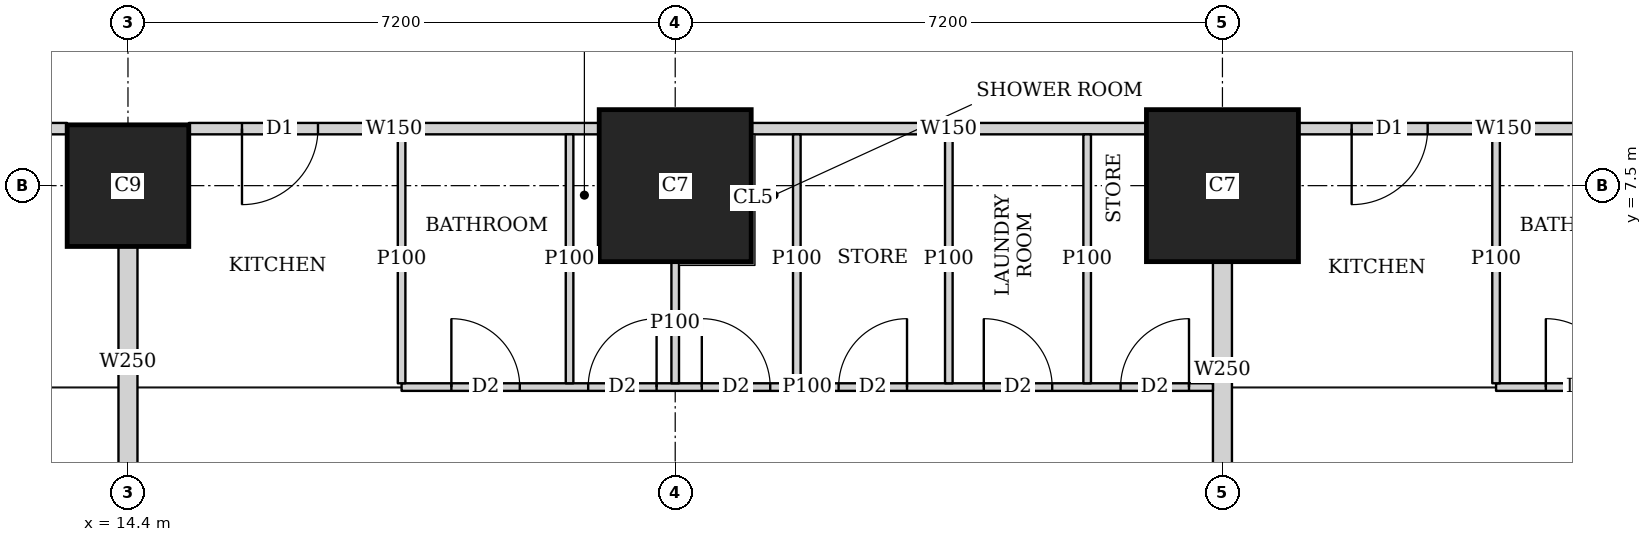
"""IFC4 building model, lengths in metres.
Left out: names, types, materials, properties, quantities, classifications, styles, units other than length and angle.
Written with IfcOpenShell. Run it as: python <this file> out.ifc"""

import sys

from ifc_helpers import new_model, si_unit, direction, frame, frame_2d, origin, origin_2d, place, context, subcontext, project, spatial, rectangle, extrude, element, fill, save


model = new_model("IFC4")
c1 = context("Model", 3, precision=1e-05, world=origin(), true_north=direction((0.0, 1.0)))
c2 = subcontext(c1, "Body", "Model", "MODEL_VIEW")
j1 = project(units=[si_unit("LENGTHUNIT", "METRE"), si_unit("PLANEANGLEUNIT", "RADIAN")], contexts=[c1])
p1 = place(None, origin())
s1 = spatial("IfcSite", under=j1, at=p1, CompositionType="ELEMENT")
p2 = place(p1, origin())
s2 = spatial("IfcBuilding", under=s1, at=p2, CompositionType="ELEMENT")
p3 = place(p2, frame((0.0, 0.0, 77.9)))
s3 = spatial("IfcBuildingStorey", under=s2, at=p3, CompositionType="ELEMENT", Elevation=77.9)
p4 = place(p3, frame((14.4, 7.5, 0.0), z_axis=(0.0, 0.0, 1.0), x_axis=(1.0, 0.0, 0.0)))
e1 = element("IfcColumn", 1, at=p4, inside=s3, PredefinedType="COLUMN", context=c2, shape_type="SweptSolid", body=[
    extrude(rectangle(XDim=1.6, YDim=1.6, at=origin_2d()), origin(), (0.0, 0.0, 1.0), 3.75),
])
for number, where, z_axis, x_axis in (
    (2, (21.6, 7.5, 0.0), (0.0, 0.0, 1.0), (1.0, 0.0, 0.0)),
    (3, (28.8, 7.5, 0.0), (0.0, 0.0, 1.0), (1.0, 0.0, 0.0)),
):
    element("IfcColumn", number, at=place(p3, frame(where, z_axis=z_axis, x_axis=x_axis)), inside=s3, PredefinedType="COLUMN", context=c2, shape_type="SweptSolid", body=[
        extrude(rectangle(XDim=2.0, YDim=2.0, at=origin_2d()), origin(), (0.0, 0.0, 1.0), 3.75),
    ])
p5 = place(p3, frame((35.199, 8.25, 0.0), z_axis=(0.0, 0.0, 1.0), x_axis=(-1.0, 0.0, 0.0)))
e4 = element("IfcWall", 4, at=p5, inside=s3, PredefinedType="SOLIDWALL", context=c2, shape_type="SweptSolid", body=[
    extrude(rectangle(XDim=5.398, YDim=0.15, at=frame_2d((2.699, 0.0))), origin(), (0.0, 0.0, 1.0), 3.5),
])
p6 = place(p5, frame((3.699, 0.0, 0.0)))
e5 = element("IfcOpeningElement", 5, at=p6, cuts=e4, PredefinedType="OPENING", context=c2, shape_type="SweptSolid", body=[
    extrude(rectangle(XDim=1.0, YDim=2.1, at=frame_2d((0.5, 1.05))), frame((0.0, 0.085, 0.0), z_axis=(0.0, -1.0, 0.0), x_axis=(1.0, 0.0, 0.0)), (0.0, 0.0, 1.0), 0.17),
])
p7 = place(p3, frame((27.799, 8.25, 0.0), z_axis=(0.0, 0.0, 1.0), x_axis=(-1.0, 0.0, 0.0)))
e6 = element("IfcWall", 6, at=p7, inside=s3, PredefinedType="SOLIDWALL", context=c2, shape_type="SweptSolid", body=[
    extrude(rectangle(XDim=5.198, YDim=0.15, at=frame_2d((2.599, 0.0))), origin(), (0.0, 0.0, 1.0), 3.5),
])
p8 = place(p3, frame((20.599, 8.25, 0.0), z_axis=(0.0, 0.0, 1.0), x_axis=(-1.0, 0.0, 0.0)))
e7 = element("IfcWall", 7, at=p8, inside=s3, PredefinedType="SOLIDWALL", context=c2, shape_type="SweptSolid", body=[
    extrude(rectangle(XDim=5.398, YDim=0.15, at=frame_2d((2.699, 0.0))), origin(), (0.0, 0.0, 1.0), 3.5),
])
p9 = place(p8, frame((3.699, 0.0, 0.0)))
e8 = element("IfcOpeningElement", 8, at=p9, cuts=e7, PredefinedType="OPENING", context=c2, shape_type="SweptSolid", body=[
    extrude(rectangle(XDim=1.0, YDim=2.1, at=frame_2d((0.5, 1.05))), frame((0.0, 0.085, 0.0), z_axis=(0.0, -1.0, 0.0), x_axis=(1.0, 0.0, 0.0)), (0.0, 0.0, 1.0), 0.17),
])
p10 = place(p3, frame((13.599, 8.25, 0.0), z_axis=(0.0, 0.0, 1.0), x_axis=(-1.0, 0.0, 0.0)))
e9 = element("IfcWall", 9, at=p10, inside=s3, PredefinedType="SOLIDWALL", context=c2, shape_type="SweptSolid", body=[
    extrude(rectangle(XDim=5.499, YDim=0.15, at=frame_2d((2.75, 0.0))), origin(), (0.0, 0.0, 1.0), 3.5),
])
p11 = place(p10, frame((0.76, 0.0, 0.0)))
e10 = element("IfcOpeningElement", 10, at=p11, cuts=e9, PredefinedType="OPENING", context=c2, shape_type="SweptSolid", body=[
    extrude(rectangle(XDim=1.0, YDim=2.1, at=frame_2d((0.5, 1.05))), frame((0.0, 0.085, 0.0), z_axis=(0.0, -1.0, 0.0), x_axis=(1.0, 0.0, 0.0)), (0.0, 0.0, 1.0), 0.17),
])
p12 = place(p3, frame((33.382, 45.65, 0.0), z_axis=(0.0, 0.0, 1.0), x_axis=(0.185593544777, -0.982626600565, 0.0)))
e11 = element("IfcWall", 11, at=p12, inside=s3, PredefinedType="SOLIDWALL", context=c2, shape_type="SweptSolid", body=[
    extrude(rectangle(XDim=47.118, YDim=0.15, at=frame_2d((23.559, 0.0))), origin(), (0.0, 0.0, 1.0), 2.2),
])
p13 = place(p12, frame((19.054, 0.0, 0.0)))
e12 = element("IfcOpeningElement", 12, at=p13, cuts=e11, PredefinedType="OPENING", context=c2, shape_type="SweptSolid", body=[
    extrude(rectangle(XDim=1.0, YDim=2.1, at=frame_2d((0.5, 1.05))), frame((0.0, 0.085, 0.0), z_axis=(0.0, -1.0, 0.0), x_axis=(1.0, 0.0, 0.0)), (0.0, 0.0, 1.0), 0.17),
])
p14 = place(p12, frame((22.87, 0.0, 0.0)))
e13 = element("IfcOpeningElement", 13, at=p14, cuts=e11, PredefinedType="OPENING", context=c2, shape_type="SweptSolid", body=[
    extrude(rectangle(XDim=1.0, YDim=2.1, at=frame_2d((0.5, 1.05))), frame((0.0, 0.085, 0.0), z_axis=(0.0, -1.0, 0.0), x_axis=(1.0, 0.0, 0.0)), (0.0, 0.0, 1.0), 0.17),
])
p15 = place(p12, frame((33.833, 0.0, 0.0)))
e14 = element("IfcOpeningElement", 14, at=p15, cuts=e11, PredefinedType="OPENING", context=c2, shape_type="SweptSolid", body=[
    extrude(rectangle(XDim=1.0, YDim=2.1, at=frame_2d((0.5, 1.05))), frame((0.0, 0.085, 0.0), z_axis=(0.0, -1.0, 0.0), x_axis=(1.0, 0.0, 0.0)), (0.0, 0.0, 1.0), 0.17),
])
p16 = place(p3, frame((28.675, 4.85, 0.0), z_axis=(0.0, 0.0, 1.0), x_axis=(-1.0, 0.0, 0.0)))
e15 = element("IfcWall", 15, at=p16, inside=s3, PredefinedType="PARTITIONING", context=c2, shape_type="SweptSolid", body=[
    extrude(rectangle(XDim=10.675, YDim=0.1, at=frame_2d((5.337, 0.0))), origin(), (0.0, 0.0, 1.0), 3.5),
])
p17 = place(p16, frame((9.12, 0.0, 0.0)))
e16 = element("IfcOpeningElement", 16, at=p17, cuts=e15, PredefinedType="OPENING", context=c2, shape_type="SweptSolid", body=[
    extrude(rectangle(XDim=0.9, YDim=2.1, at=frame_2d((0.45, 1.05))), frame((0.0, 0.06, 0.0), z_axis=(0.0, -1.0, 0.0), x_axis=(1.0, 0.0, 0.0)), (0.0, 0.0, 1.0), 0.12),
])
p18 = place(p16, frame((5.825, 0.0, 0.0)))
e17 = element("IfcOpeningElement", 17, at=p18, cuts=e15, PredefinedType="OPENING", context=c2, shape_type="SweptSolid", body=[
    extrude(rectangle(XDim=0.9, YDim=2.1, at=frame_2d((0.45, 1.05))), frame((0.0, 0.06, 0.0), z_axis=(0.0, -1.0, 0.0), x_axis=(1.0, 0.0, 0.0)), (0.0, 0.0, 1.0), 0.12),
])
p19 = place(p16, frame((2.115, 0.0, 0.0)))
e18 = element("IfcOpeningElement", 18, at=p19, cuts=e15, PredefinedType="OPENING", context=c2, shape_type="SweptSolid", body=[
    extrude(rectangle(XDim=0.9, YDim=2.1, at=frame_2d((0.45, 1.05))), frame((0.0, 0.06, 0.0), z_axis=(0.0, -1.0, 0.0), x_axis=(1.0, 0.0, 0.0)), (0.0, 0.0, 1.0), 0.12),
])
p20 = place(p16, frame((7.32, 0.0, 0.0)))
e19 = element("IfcOpeningElement", 19, at=p20, cuts=e15, PredefinedType="OPENING", context=c2, shape_type="SweptSolid", body=[
    extrude(rectangle(XDim=0.9, YDim=2.1, at=frame_2d((0.45, 1.05))), frame((0.0, 0.06, 0.0), z_axis=(0.0, -1.0, 0.0), x_axis=(1.0, 0.0, 0.0)), (0.0, 0.0, 1.0), 0.12),
])
p21 = place(p16, frame((4.025, 0.0, 0.0)))
e20 = element("IfcOpeningElement", 20, at=p21, cuts=e15, PredefinedType="OPENING", context=c2, shape_type="SweptSolid", body=[
    extrude(rectangle(XDim=0.9, YDim=2.1, at=frame_2d((0.45, 1.05))), frame((0.0, 0.06, 0.0), z_axis=(0.0, -1.0, 0.0), x_axis=(1.0, 0.0, 0.0)), (0.0, 0.0, 1.0), 0.12),
])
p22 = place(p16, frame((0.315, 0.0, 0.0)))
e21 = element("IfcOpeningElement", 21, at=p22, cuts=e15, PredefinedType="OPENING", context=c2, shape_type="SweptSolid", body=[
    extrude(rectangle(XDim=0.9, YDim=2.1, at=frame_2d((0.45, 1.05))), frame((0.0, 0.06, 0.0), z_axis=(0.0, -1.0, 0.0), x_axis=(1.0, 0.0, 0.0)), (0.0, 0.0, 1.0), 0.12),
])
p23 = place(p3, frame((18.0, 4.9, 0.0), z_axis=(0.0, 0.0, 1.0), x_axis=(0.0, 1.0, 0.0)))
e22 = element("IfcWall", 22, at=p23, inside=s3, PredefinedType="PARTITIONING", context=c2, shape_type="SweptSolid", body=[
    extrude(rectangle(XDim=3.275, YDim=0.1, at=frame_2d((1.638, 0.0))), origin(), (0.0, 0.0, 1.0), 3.5),
])
p24 = place(p3, frame((21.6, 4.9, 0.0), z_axis=(0.0, 0.0, 1.0), x_axis=(0.0, 1.0, 0.0)))
e23 = element("IfcWall", 23, at=p24, inside=s3, PredefinedType="PARTITIONING", context=c2, shape_type="SweptSolid", body=[
    extrude(rectangle(XDim=1.599, YDim=0.1, at=frame_2d((0.8, 0.0))), origin(), (0.0, 0.0, 1.0), 3.5),
])
for number, where, z_axis, x_axis in (
    (24, (25.2, 4.9, 0.0), (0.0, 0.0, 1.0), (0.0, 1.0, 0.0)),
    (25, (20.21, 4.9, 0.0), (0.0, 0.0, 1.0), (0.0, 1.0, 0.0)),
    (26, (23.2, 4.9, 0.0), (0.0, 0.0, 1.0), (0.0, 1.0, 0.0)),
    (27, (27.02, 4.9, 0.0), (0.0, 0.0, 1.0), (0.0, 1.0, 0.0)),
):
    element("IfcWall", number, at=place(p3, frame(where, z_axis=z_axis, x_axis=x_axis)), inside=s3, PredefinedType="PARTITIONING", context=c2, shape_type="SweptSolid", body=[
        extrude(rectangle(XDim=3.275, YDim=0.1, at=frame_2d((1.638, 0.0))), origin(), (0.0, 0.0, 1.0), 3.5),
    ])
p25 = place(p3, frame((14.4, 3.65, 0.0), z_axis=(0.0, 0.0, 1.0), x_axis=(0.0, 1.0, 0.0)))
e28 = element("IfcWall", 28, at=p25, inside=s3, PredefinedType="SOLIDWALL", context=c2, shape_type="SweptSolid", body=[
    extrude(rectangle(XDim=3.049, YDim=0.25, at=frame_2d((1.524, 0.0))), origin(), (0.0, 0.0, 1.0), 3.5),
])
p26 = place(p3, frame((41.002, 4.85, 0.0), z_axis=(0.0, 0.0, 1.0), x_axis=(-1.0, 0.0, 0.0)))
e29 = element("IfcWall", 29, at=p26, inside=s3, PredefinedType="PARTITIONING", context=c2, shape_type="SweptSolid", body=[
    extrude(rectangle(XDim=8.602, YDim=0.1, at=frame_2d((4.301, 0.0))), origin(), (0.0, 0.0, 1.0), 3.5),
])
p27 = place(p26, frame((7.047, 0.0, 0.0)))
e30 = element("IfcOpeningElement", 30, at=p27, cuts=e29, PredefinedType="OPENING", context=c2, shape_type="SweptSolid", body=[
    extrude(rectangle(XDim=0.9, YDim=2.1, at=frame_2d((0.45, 1.05))), frame((0.0, 0.06, 0.0), z_axis=(0.0, -1.0, 0.0), x_axis=(1.0, 0.0, 0.0)), (0.0, 0.0, 1.0), 0.12),
])
p28 = place(p26, frame((3.752, 0.0, 0.0)))
e31 = element("IfcOpeningElement", 31, at=p28, cuts=e29, PredefinedType="OPENING", context=c2, shape_type="SweptSolid", body=[
    extrude(rectangle(XDim=0.9, YDim=2.1, at=frame_2d((0.45, 1.05))), frame((0.0, 0.06, 0.0), z_axis=(0.0, -1.0, 0.0), x_axis=(1.0, 0.0, 0.0)), (0.0, 0.0, 1.0), 0.12),
])
p29 = place(p26, frame((0.15, 0.0, 0.0)))
e32 = element("IfcOpeningElement", 32, at=p29, cuts=e29, PredefinedType="OPENING", context=c2, shape_type="SweptSolid", body=[
    extrude(rectangle(XDim=0.9, YDim=2.1, at=frame_2d((0.45, 1.05))), frame((0.0, 0.06, 0.0), z_axis=(0.0, -1.0, 0.0), x_axis=(1.0, 0.0, 0.0)), (0.0, 0.0, 1.0), 0.12),
])
p30 = place(p26, frame((5.247, 0.0, 0.0)))
e33 = element("IfcOpeningElement", 33, at=p30, cuts=e29, PredefinedType="OPENING", context=c2, shape_type="SweptSolid", body=[
    extrude(rectangle(XDim=0.9, YDim=2.1, at=frame_2d((0.45, 1.05))), frame((0.0, 0.06, 0.0), z_axis=(0.0, -1.0, 0.0), x_axis=(1.0, 0.0, 0.0)), (0.0, 0.0, 1.0), 0.12),
])
p31 = place(p26, frame((1.952, 0.0, 0.0)))
e34 = element("IfcOpeningElement", 34, at=p31, cuts=e29, PredefinedType="OPENING", context=c2, shape_type="SweptSolid", body=[
    extrude(rectangle(XDim=0.9, YDim=2.1, at=frame_2d((0.45, 1.05))), frame((0.0, 0.06, 0.0), z_axis=(0.0, -1.0, 0.0), x_axis=(1.0, 0.0, 0.0)), (0.0, 0.0, 1.0), 0.12),
])
p32 = place(p3, frame((32.4, 4.9, 0.0), z_axis=(0.0, 0.0, 1.0), x_axis=(0.0, 1.0, 0.0)))
e35 = element("IfcWall", 35, at=p32, inside=s3, PredefinedType="PARTITIONING", context=c2, shape_type="SweptSolid", body=[
    extrude(rectangle(XDim=3.275, YDim=0.1, at=frame_2d((1.638, 0.0))), origin(), (0.0, 0.0, 1.0), 3.5),
])
p33 = place(p3, frame((28.8, 3.65, 0.0), z_axis=(0.0, 0.0, 1.0), x_axis=(0.0, 1.0, 0.0)))
e36 = element("IfcWall", 36, at=p33, inside=s3, PredefinedType="SOLIDWALL", context=c2, shape_type="SweptSolid", body=[
    extrude(rectangle(XDim=2.849, YDim=0.25, at=frame_2d((1.425, 0.0))), origin(), (0.0, 0.0, 1.0), 3.5),
])
p34 = place(p17, origin())
e37 = element("IfcDoor", 37, at=p34, inside=s3, OperationType="SINGLE_SWING_LEFT", PredefinedType="DOOR", context=c2, shape_type="SweptSolid", body=[
    extrude(rectangle(XDim=0.9, YDim=2.1, at=frame_2d((0.45, 1.05))), frame((0.0, 0.025, 0.0), z_axis=(0.0, -1.0, 0.0), x_axis=(1.0, 0.0, 0.0)), (0.0, 0.0, 1.0), 0.05),
])
fill(e16, e37)
p35 = place(p18, origin())
e38 = element("IfcDoor", 38, at=p35, inside=s3, OperationType="SINGLE_SWING_LEFT", PredefinedType="DOOR", context=c2, shape_type="SweptSolid", body=[
    extrude(rectangle(XDim=0.9, YDim=2.1, at=frame_2d((0.45, 1.05))), frame((0.0, 0.025, 0.0), z_axis=(0.0, -1.0, 0.0), x_axis=(1.0, 0.0, 0.0)), (0.0, 0.0, 1.0), 0.05),
])
fill(e17, e38)
p36 = place(p19, origin())
e39 = element("IfcDoor", 39, at=p36, inside=s3, OperationType="SINGLE_SWING_LEFT", PredefinedType="DOOR", context=c2, shape_type="SweptSolid", body=[
    extrude(rectangle(XDim=0.9, YDim=2.1, at=frame_2d((0.45, 1.05))), frame((0.0, 0.025, 0.0), z_axis=(0.0, -1.0, 0.0), x_axis=(1.0, 0.0, 0.0)), (0.0, 0.0, 1.0), 0.05),
])
fill(e18, e39)
p37 = place(p20, origin())
e40 = element("IfcDoor", 40, at=p37, inside=s3, OperationType="SINGLE_SWING_RIGHT", PredefinedType="DOOR", context=c2, shape_type="SweptSolid", body=[
    extrude(rectangle(XDim=0.9, YDim=2.1, at=frame_2d((0.45, 1.05))), frame((0.0, 0.025, 0.0), z_axis=(0.0, -1.0, 0.0), x_axis=(1.0, 0.0, 0.0)), (0.0, 0.0, 1.0), 0.05),
])
fill(e19, e40)
p38 = place(p21, origin())
e41 = element("IfcDoor", 41, at=p38, inside=s3, OperationType="SINGLE_SWING_RIGHT", PredefinedType="DOOR", context=c2, shape_type="SweptSolid", body=[
    extrude(rectangle(XDim=0.9, YDim=2.1, at=frame_2d((0.45, 1.05))), frame((0.0, 0.025, 0.0), z_axis=(0.0, -1.0, 0.0), x_axis=(1.0, 0.0, 0.0)), (0.0, 0.0, 1.0), 0.05),
])
fill(e20, e41)
p39 = place(p22, origin())
e42 = element("IfcDoor", 42, at=p39, inside=s3, OperationType="SINGLE_SWING_RIGHT", PredefinedType="DOOR", context=c2, shape_type="SweptSolid", body=[
    extrude(rectangle(XDim=0.9, YDim=2.1, at=frame_2d((0.45, 1.05))), frame((0.0, 0.025, 0.0), z_axis=(0.0, -1.0, 0.0), x_axis=(1.0, 0.0, 0.0)), (0.0, 0.0, 1.0), 0.05),
])
fill(e21, e42)
p40 = place(p9, origin())
e43 = element("IfcDoor", 43, at=p40, inside=s3, OperationType="SINGLE_SWING_RIGHT", PredefinedType="DOOR", context=c2, shape_type="SweptSolid", body=[
    extrude(rectangle(XDim=1.0, YDim=2.1, at=frame_2d((0.5, 1.05))), frame((0.0, 0.025, 0.0), z_axis=(0.0, -1.0, 0.0), x_axis=(1.0, 0.0, 0.0)), (0.0, 0.0, 1.0), 0.05),
])
fill(e8, e43)
p41 = place(p27, origin())
e44 = element("IfcDoor", 44, at=p41, inside=s3, OperationType="SINGLE_SWING_LEFT", PredefinedType="DOOR", context=c2, shape_type="SweptSolid", body=[
    extrude(rectangle(XDim=0.9, YDim=2.1, at=frame_2d((0.45, 1.05))), frame((0.0, 0.025, 0.0), z_axis=(0.0, -1.0, 0.0), x_axis=(1.0, 0.0, 0.0)), (0.0, 0.0, 1.0), 0.05),
])
fill(e30, e44)
p42 = place(p6, origin())
e45 = element("IfcDoor", 45, at=p42, inside=s3, OperationType="SINGLE_SWING_RIGHT", PredefinedType="DOOR", context=c2, shape_type="SweptSolid", body=[
    extrude(rectangle(XDim=1.0, YDim=2.1, at=frame_2d((0.5, 1.05))), frame((0.0, 0.025, 0.0), z_axis=(0.0, -1.0, 0.0), x_axis=(1.0, 0.0, 0.0)), (0.0, 0.0, 1.0), 0.05),
])
fill(e5, e45)
save(model, sys.argv[1])
